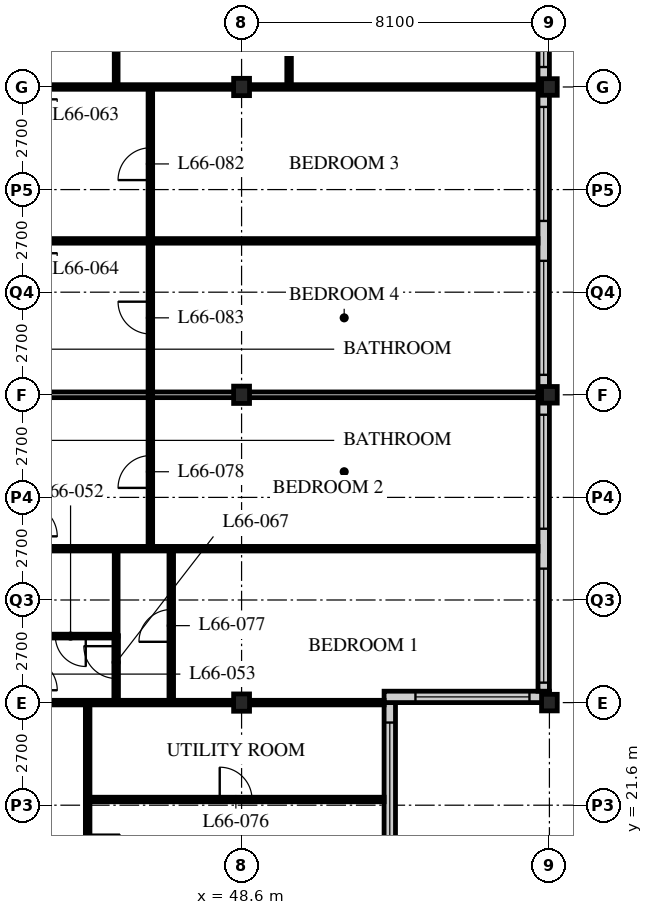
"""IFC4 building model, lengths in metres.
Left out: names, types, materials, properties, quantities, classifications, styles, units other than length and angle.
Written with IfcOpenShell. Run it as: python <this file> out.ifc"""

import sys

from ifc_helpers import new_model, si_unit, direction, frame, frame_2d, origin, origin_2d, place, context, subcontext, project, spatial, rectangle, i_section, extrude, element, fill, save


model = new_model("IFC4")
c1 = context("Model", 3, precision=1e-05, world=origin(), true_north=direction((0.0, 1.0)))
c2 = subcontext(c1, "Body", "Model", "MODEL_VIEW")
j1 = project(units=[si_unit("LENGTHUNIT", "METRE"), si_unit("PLANEANGLEUNIT", "RADIAN")], contexts=[c1])
p1 = place(None, origin())
s1 = spatial("IfcSite", under=j1, at=p1, CompositionType="ELEMENT")
p2 = place(p1, origin())
s2 = spatial("IfcBuilding", under=s1, at=p2, CompositionType="ELEMENT")
p3 = place(p2, frame((0.0, 0.0, 258.0)))
s3 = spatial("IfcBuildingStorey", under=s2, at=p3, CompositionType="ELEMENT", Elevation=258.0)
for number, where, z_axis, x_axis in (
    (1, (48.6, 24.3, 0.0), (0.0, 0.0, 1.0), (1.0, 0.0, 0.0)),
    (2, (48.6, 32.4, 0.0), (0.0, 0.0, 1.0), (1.0, 0.0, 0.0)),
    (3, (48.6, 40.5, 0.0), (0.0, 0.0, 1.0), (1.0, 0.0, 0.0)),
):
    element("IfcColumn", number, at=place(p3, frame(where, z_axis=z_axis, x_axis=x_axis)), inside=s3, PredefinedType="COLUMN", context=c2, shape_type="SweptSolid", body=[
        extrude(i_section(OverallWidth=0.418, OverallDepth=0.456, WebThickness=0.042, FlangeThickness=0.067, FilletRadius=0.015, at=origin_2d()), origin(), (0.0, 0.0, 1.0), 3.9),
    ])
for number, where, z_axis, x_axis in (
    (4, (56.7, 24.3, 0.0), (0.0, 0.0, 1.0), (1.0, 0.0, 0.0)),
    (5, (56.7, 32.4, 0.0), (0.0, 0.0, 1.0), (1.0, 0.0, 0.0)),
    (6, (56.7, 40.5, 0.0), (0.0, 0.0, 1.0), (1.0, 0.0, 0.0)),
):
    element("IfcColumn", number, at=place(p3, frame(where, z_axis=z_axis, x_axis=x_axis)), inside=s3, PredefinedType="COLUMN", context=c2, shape_type="SweptSolid", body=[
        extrude(i_section(OverallWidth=0.412, OverallDepth=0.437, WebThickness=0.036, FlangeThickness=0.058, FilletRadius=0.015, at=origin_2d()), origin(), (0.0, 0.0, 1.0), 3.9),
    ])
p4 = place(p3, frame((52.5, 20.55, 0.0), z_axis=(0.0, 0.0, 1.0), x_axis=(0.0, 1.0, 0.0)))
e7 = element("IfcWall", 7, at=p4, inside=s3, PredefinedType="SOLIDWALL", context=c2, shape_type="SweptSolid", body=[
    extrude(rectangle(XDim=3.75, YDim=0.3, at=frame_2d((1.875, 0.0))), origin(), (0.0, 0.0, 1.0), 3.69),
])
p5 = place(p4, frame((0.225, 0.0, 0.6)))
e8 = element("IfcOpeningElement", 8, at=p5, cuts=e7, PredefinedType="OPENING", context=c2, shape_type="SweptSolid", body=[
    extrude(rectangle(XDim=3.0, YDim=2.3, at=frame_2d((1.5, 1.15))), frame((0.0, 0.16, 0.0), z_axis=(0.0, -1.0, 0.0), x_axis=(1.0, 0.0, 0.0)), (0.0, 0.0, 1.0), 0.32),
])
p6 = place(p3, frame((52.35, 24.45, 0.0), z_axis=(0.0, 0.0, 1.0), x_axis=(1.0, 0.0, 0.0)))
e9 = element("IfcWall", 9, at=p6, inside=s3, PredefinedType="SOLIDWALL", context=c2, shape_type="SweptSolid", body=[
    extrude(rectangle(XDim=4.35, YDim=0.3, at=frame_2d((2.175, 0.0))), origin(), (0.0, 0.0, 1.0), 3.69),
])
p7 = place(p6, frame((0.825, 0.0, 0.6)))
e10 = element("IfcOpeningElement", 10, at=p7, cuts=e9, PredefinedType="OPENING", context=c2, shape_type="SweptSolid", body=[
    extrude(rectangle(XDim=3.0, YDim=2.3, at=frame_2d((1.5, 1.15))), frame((0.0, 0.16, 0.0), z_axis=(0.0, -1.0, 0.0), x_axis=(1.0, 0.0, 0.0)), (0.0, 0.0, 1.0), 0.32),
])
p8 = place(p3, frame((56.55, 24.6, 0.0), z_axis=(0.0, 0.0, 1.0), x_axis=(0.0, 1.0, 0.0)))
e11 = element("IfcWall", 11, at=p8, inside=s3, PredefinedType="SOLIDWALL", context=c2, shape_type="SweptSolid", body=[
    extrude(rectangle(XDim=32.1, YDim=0.3, at=frame_2d((16.05, 0.0))), origin(), (0.0, 0.0, 1.0), 3.69),
])
p9 = place(p8, frame((0.225, 0.0, 0.6)))
e12 = element("IfcOpeningElement", 12, at=p9, cuts=e11, PredefinedType="OPENING", context=c2, shape_type="SweptSolid", body=[
    extrude(rectangle(XDim=3.0, YDim=2.4, at=frame_2d((1.5, 1.2))), frame((0.0, 0.16, 0.0), z_axis=(0.0, -1.0, 0.0), x_axis=(1.0, 0.0, 0.0)), (0.0, 0.0, 1.0), 0.32),
])
p10 = place(p8, frame((4.275, 0.0, 0.6)))
e13 = element("IfcOpeningElement", 13, at=p10, cuts=e11, PredefinedType="OPENING", context=c2, shape_type="SweptSolid", body=[
    extrude(rectangle(XDim=3.0, YDim=2.4, at=frame_2d((1.5, 1.2))), frame((0.0, 0.16, 0.0), z_axis=(0.0, -1.0, 0.0), x_axis=(1.0, 0.0, 0.0)), (0.0, 0.0, 1.0), 0.32),
])
p11 = place(p8, frame((8.325, 0.0, 0.6)))
e14 = element("IfcOpeningElement", 14, at=p11, cuts=e11, PredefinedType="OPENING", context=c2, shape_type="SweptSolid", body=[
    extrude(rectangle(XDim=3.0, YDim=2.4, at=frame_2d((1.5, 1.2))), frame((0.0, 0.16, 0.0), z_axis=(0.0, -1.0, 0.0), x_axis=(1.0, 0.0, 0.0)), (0.0, 0.0, 1.0), 0.32),
])
p12 = place(p8, frame((12.375, 0.0, 0.6)))
e15 = element("IfcOpeningElement", 15, at=p12, cuts=e11, PredefinedType="OPENING", context=c2, shape_type="SweptSolid", body=[
    extrude(rectangle(XDim=3.0, YDim=2.4, at=frame_2d((1.5, 1.2))), frame((0.0, 0.16, 0.0), z_axis=(0.0, -1.0, 0.0), x_axis=(1.0, 0.0, 0.0)), (0.0, 0.0, 1.0), 0.32),
])
p13 = place(p8, frame((16.425, 0.0, 0.6)))
e16 = element("IfcOpeningElement", 16, at=p13, cuts=e11, PredefinedType="OPENING", context=c2, shape_type="SweptSolid", body=[
    extrude(rectangle(XDim=3.0, YDim=2.4, at=frame_2d((1.5, 1.2))), frame((0.0, 0.16, 0.0), z_axis=(0.0, -1.0, 0.0), x_axis=(1.0, 0.0, 0.0)), (0.0, 0.0, 1.0), 0.32),
])
p14 = place(p8, frame((20.475, 0.0, 0.6)))
e17 = element("IfcOpeningElement", 17, at=p14, cuts=e11, PredefinedType="OPENING", context=c2, shape_type="SweptSolid", body=[
    extrude(rectangle(XDim=3.0, YDim=2.4, at=frame_2d((1.5, 1.2))), frame((0.0, 0.16, 0.0), z_axis=(0.0, -1.0, 0.0), x_axis=(1.0, 0.0, 0.0)), (0.0, 0.0, 1.0), 0.32),
])
p15 = place(p8, frame((24.525, 0.0, 0.6)))
e18 = element("IfcOpeningElement", 18, at=p15, cuts=e11, PredefinedType="OPENING", context=c2, shape_type="SweptSolid", body=[
    extrude(rectangle(XDim=3.0, YDim=2.4, at=frame_2d((1.5, 1.2))), frame((0.0, 0.16, 0.0), z_axis=(0.0, -1.0, 0.0), x_axis=(1.0, 0.0, 0.0)), (0.0, 0.0, 1.0), 0.32),
])
p16 = place(p8, frame((28.575, 0.0, 0.6)))
e19 = element("IfcOpeningElement", 19, at=p16, cuts=e11, PredefinedType="OPENING", context=c2, shape_type="SweptSolid", body=[
    extrude(rectangle(XDim=3.0, YDim=2.4, at=frame_2d((1.5, 1.2))), frame((0.0, 0.16, 0.0), z_axis=(0.0, -1.0, 0.0), x_axis=(1.0, 0.0, 0.0)), (0.0, 0.0, 1.0), 0.32),
])
p17 = place(p3, frame((42.9, 24.3, 0.0), z_axis=(0.0, 0.0, 1.0), x_axis=(1.0, 0.0, 0.0)))
e20 = element("IfcWall", 20, at=p17, inside=s3, PredefinedType="PARTITIONING", context=c2, shape_type="SweptSolid", body=[
    extrude(rectangle(XDim=9.45, YDim=0.12, at=frame_2d((4.725, 0.0))), origin(), (0.0, 0.0, 1.0), 3.078),
])
p18 = place(p3, frame((40.5, 32.4, 0.0), z_axis=(0.0, 0.0, 1.0), x_axis=(1.0, 0.0, 0.0)))
e21 = element("IfcWall", 21, at=p18, inside=s3, PredefinedType="PARTITIONING", context=c2, shape_type="SweptSolid", body=[
    extrude(rectangle(XDim=15.9, YDim=0.15, at=frame_2d((7.95, 0.0))), origin(), (0.0, 0.0, 1.0), 3.078),
])
p19 = place(p3, frame((44.55, 16.5, 0.0), z_axis=(0.0, 0.0, 1.0), x_axis=(0.0, 1.0, 0.0)))
e22 = element("IfcWall", 22, at=p19, inside=s3, PredefinedType="PARTITIONING", context=c2, shape_type="SweptSolid", body=[
    extrude(rectangle(XDim=7.8, YDim=0.12, at=frame_2d((3.9, 0.0))), origin(), (0.0, 0.0, 1.0), 3.69),
])
p20 = place(p19, frame((3.475, 0.0, 0.0)))
e23 = element("IfcOpeningElement", 23, at=p20, cuts=e22, PredefinedType="OPENING", context=c2, shape_type="SweptSolid", body=[
    extrude(rectangle(XDim=0.85, YDim=2.1, at=frame_2d((0.425, 1.05))), frame((0.0, 0.07, 0.0), z_axis=(0.0, -1.0, 0.0), x_axis=(1.0, 0.0, 0.0)), (0.0, 0.0, 1.0), 0.14),
])
p21 = place(p3, frame((42.9, 26.05, 0.0), z_axis=(0.0, 0.0, 1.0), x_axis=(1.0, 0.0, 0.0)))
e24 = element("IfcWall", 24, at=p21, inside=s3, PredefinedType="PARTITIONING", context=c2, shape_type="SweptSolid", body=[
    extrude(rectangle(XDim=2.4, YDim=0.1, at=frame_2d((1.2, 0.0))), origin(), (0.0, 0.0, 1.0), 3.69),
])
p22 = place(p21, frame((0.8, 0.0, 0.0)))
e25 = element("IfcOpeningElement", 25, at=p22, cuts=e24, PredefinedType="OPENING", context=c2, shape_type="SweptSolid", body=[
    extrude(rectangle(XDim=0.8, YDim=2.1, at=frame_2d((0.4, 1.05))), frame((0.0, 0.06, 0.0), z_axis=(0.0, -1.0, 0.0), x_axis=(1.0, 0.0, 0.0)), (0.0, 0.0, 1.0), 0.12),
])
p23 = place(p3, frame((45.3, 26.05, 0.0), z_axis=(0.0, 0.0, 1.0), x_axis=(0.0, 1.0, 0.0)))
e26 = element("IfcWall", 26, at=p23, inside=s3, PredefinedType="PARTITIONING", context=c2, shape_type="SweptSolid", body=[
    extrude(rectangle(XDim=2.3, YDim=0.1, at=frame_2d((1.15, 0.0))), origin(), (0.0, 0.0, 1.0), 3.69),
])
p24 = place(p3, frame((42.9, 28.35, 0.0), z_axis=(0.0, 0.0, 1.0), x_axis=(1.0, 0.0, 0.0)))
e27 = element("IfcWall", 27, at=p24, inside=s3, PredefinedType="PARTITIONING", context=c2, shape_type="SweptSolid", body=[
    extrude(rectangle(XDim=13.5, YDim=0.12, at=frame_2d((6.75, 0.0))), origin(), (0.0, 0.0, 1.0), 3.69),
])
p25 = place(p3, frame((45.3, 42.8, 0.0), z_axis=(0.0, 0.0, 1.0), x_axis=(0.0, -1.0, 0.0)))
e28 = element("IfcWall", 28, at=p25, inside=s3, PredefinedType="PARTITIONING", context=c2, shape_type="SweptSolid", body=[
    extrude(rectangle(XDim=2.3, YDim=0.1, at=frame_2d((1.15, 0.0))), origin(), (0.0, 0.0, 1.0), 3.69),
])
p26 = place(p3, frame((42.9, 40.5, 0.0), z_axis=(0.0, 0.0, 1.0), x_axis=(1.0, 0.0, 0.0)))
e29 = element("IfcWall", 29, at=p26, inside=s3, PredefinedType="PARTITIONING", context=c2, shape_type="SweptSolid", body=[
    extrude(rectangle(XDim=13.5, YDim=0.12, at=frame_2d((6.75, 0.0))), origin(), (0.0, 0.0, 1.0), 3.078),
])
p27 = place(p3, frame((42.9, 36.45, 0.0), z_axis=(0.0, 0.0, 1.0), x_axis=(1.0, 0.0, 0.0)))
e30 = element("IfcWall", 30, at=p27, inside=s3, PredefinedType="PARTITIONING", context=c2, shape_type="SweptSolid", body=[
    extrude(rectangle(XDim=13.5, YDim=0.12, at=frame_2d((6.75, 0.0))), origin(), (0.0, 0.0, 1.0), 3.69),
])
p28 = place(p3, frame((45.3, 24.3, 0.0), z_axis=(0.0, 0.0, 1.0), x_axis=(0.0, 1.0, 0.0)))
e31 = element("IfcWall", 31, at=p28, inside=s3, PredefinedType="PARTITIONING", context=c2, shape_type="SweptSolid", body=[
    extrude(rectangle(XDim=1.76, YDim=0.12, at=frame_2d((0.88, 0.0))), origin(), (0.0, 0.0, 1.0), 3.69),
])
p29 = place(p28, frame((0.635, 0.0, 0.0)))
e32 = element("IfcOpeningElement", 32, at=p29, cuts=e31, PredefinedType="OPENING", context=c2, shape_type="SweptSolid", body=[
    extrude(rectangle(XDim=0.85, YDim=2.1, at=frame_2d((0.425, 1.05))), frame((0.0, 0.07, 0.0), z_axis=(0.0, -1.0, 0.0), x_axis=(1.0, 0.0, 0.0)), (0.0, 0.0, 1.0), 0.14),
])
p30 = place(p3, frame((44.55, 21.75, 0.0), z_axis=(0.0, 0.0, 1.0), x_axis=(1.0, 0.0, 0.0)))
e33 = element("IfcWall", 33, at=p30, inside=s3, PredefinedType="PARTITIONING", context=c2, shape_type="SweptSolid", body=[
    extrude(rectangle(XDim=7.8, YDim=0.12, at=frame_2d((3.9, 0.0))), origin(), (0.0, 0.0, 1.0), 3.69),
])
p31 = place(p30, frame((3.475, 0.0, 0.0)))
e34 = element("IfcOpeningElement", 34, at=p31, cuts=e33, PredefinedType="OPENING", context=c2, shape_type="SweptSolid", body=[
    extrude(rectangle(XDim=0.85, YDim=2.1, at=frame_2d((0.425, 1.05))), frame((0.0, 0.07, 0.0), z_axis=(0.0, -1.0, 0.0), x_axis=(1.0, 0.0, 0.0)), (0.0, 0.0, 1.0), 0.14),
])
p32 = place(p3, frame((46.75, 24.3, 0.0), z_axis=(0.0, 0.0, 1.0), x_axis=(0.0, 1.0, 0.0)))
e35 = element("IfcWall", 35, at=p32, inside=s3, PredefinedType="PARTITIONING", context=c2, shape_type="SweptSolid", body=[
    extrude(rectangle(XDim=4.05, YDim=0.12, at=frame_2d((2.025, 0.0))), origin(), (0.0, 0.0, 1.0), 3.69),
])
p33 = place(p32, frame((1.6, 0.0, 0.0)))
e36 = element("IfcOpeningElement", 36, at=p33, cuts=e35, PredefinedType="OPENING", context=c2, shape_type="SweptSolid", body=[
    extrude(rectangle(XDim=0.85, YDim=2.1, at=frame_2d((0.425, 1.05))), frame((0.0, 0.07, 0.0), z_axis=(0.0, -1.0, 0.0), x_axis=(1.0, 0.0, 0.0)), (0.0, 0.0, 1.0), 0.14),
])
p34 = place(p3, frame((46.2, 28.35, 0.0), z_axis=(0.0, 0.0, 1.0), x_axis=(0.0, 1.0, 0.0)))
e37 = element("IfcWall", 37, at=p34, inside=s3, PredefinedType="PARTITIONING", context=c2, shape_type="SweptSolid", body=[
    extrude(rectangle(XDim=12.15, YDim=0.12, at=frame_2d((6.075, 0.0))), origin(), (0.0, 0.0, 1.0), 3.69),
])
p35 = place(p34, frame((1.6, 0.0, 0.0)))
e38 = element("IfcOpeningElement", 38, at=p35, cuts=e37, PredefinedType="OPENING", context=c2, shape_type="SweptSolid", body=[
    extrude(rectangle(XDim=0.85, YDim=2.1, at=frame_2d((0.425, 1.05))), frame((0.0, 0.07, 0.0), z_axis=(0.0, -1.0, 0.0), x_axis=(1.0, 0.0, 0.0)), (0.0, 0.0, 1.0), 0.14),
])
p36 = place(p34, frame((9.7, 0.0, 0.0)))
e39 = element("IfcOpeningElement", 39, at=p36, cuts=e37, PredefinedType="OPENING", context=c2, shape_type="SweptSolid", body=[
    extrude(rectangle(XDim=0.85, YDim=2.1, at=frame_2d((0.425, 1.05))), frame((0.0, 0.07, 0.0), z_axis=(0.0, -1.0, 0.0), x_axis=(1.0, 0.0, 0.0)), (0.0, 0.0, 1.0), 0.14),
])
p37 = place(p34, frame((5.65, 0.0, 0.0)))
e40 = element("IfcOpeningElement", 40, at=p37, cuts=e37, PredefinedType="OPENING", context=c2, shape_type="SweptSolid", body=[
    extrude(rectangle(XDim=0.85, YDim=2.1, at=frame_2d((0.425, 1.05))), frame((0.0, 0.07, 0.0), z_axis=(0.0, -1.0, 0.0), x_axis=(1.0, 0.0, 0.0)), (0.0, 0.0, 1.0), 0.14),
])
p38 = place(p3, frame((49.85, 40.5, 0.0), z_axis=(0.0, 0.0, 1.0), x_axis=(0.0, 1.0, 0.0)))
e41 = element("IfcWall", 41, at=p38, inside=s3, PredefinedType="PARTITIONING", context=c2, shape_type="SweptSolid", body=[
    extrude(rectangle(XDim=6.3, YDim=0.12, at=frame_2d((3.15, 0.0))), origin(), (0.0, 0.0, 1.0), 3.69),
])
p39 = place(p38, frame((2.725, 0.0, 0.0)))
e42 = element("IfcOpeningElement", 42, at=p39, cuts=e41, PredefinedType="OPENING", context=c2, shape_type="SweptSolid", body=[
    extrude(rectangle(XDim=0.85, YDim=2.1, at=frame_2d((0.425, 1.05))), frame((0.0, 0.07, 0.0), z_axis=(0.0, -1.0, 0.0), x_axis=(1.0, 0.0, 0.0)), (0.0, 0.0, 1.0), 0.14),
])
p40 = place(p5, origin())
e43 = element("IfcWindow", 43, at=p40, inside=s3, PartitioningType="SINGLE_PANEL", PredefinedType="WINDOW", context=c2, shape_type="SweptSolid", body=[
    extrude(rectangle(XDim=3.0, YDim=2.3, at=frame_2d((1.5, 1.15))), frame((0.0, 0.03, 0.0), z_axis=(0.0, -1.0, 0.0), x_axis=(1.0, 0.0, 0.0)), (0.0, 0.0, 1.0), 0.06),
])
fill(e8, e43)
p41 = place(p7, origin())
e44 = element("IfcWindow", 44, at=p41, inside=s3, PartitioningType="SINGLE_PANEL", PredefinedType="WINDOW", context=c2, shape_type="SweptSolid", body=[
    extrude(rectangle(XDim=3.0, YDim=2.3, at=frame_2d((1.5, 1.15))), frame((0.0, 0.03, 0.0), z_axis=(0.0, -1.0, 0.0), x_axis=(1.0, 0.0, 0.0)), (0.0, 0.0, 1.0), 0.06),
])
fill(e10, e44)
p42 = place(p9, origin())
e45 = element("IfcWindow", 45, at=p42, inside=s3, PartitioningType="SINGLE_PANEL", PredefinedType="WINDOW", context=c2, shape_type="SweptSolid", body=[
    extrude(rectangle(XDim=3.0, YDim=2.4, at=frame_2d((1.5, 1.2))), frame((0.0, 0.03, 0.0), z_axis=(0.0, -1.0, 0.0), x_axis=(1.0, 0.0, 0.0)), (0.0, 0.0, 1.0), 0.06),
])
fill(e12, e45)
p43 = place(p10, origin())
e46 = element("IfcWindow", 46, at=p43, inside=s3, PartitioningType="SINGLE_PANEL", PredefinedType="WINDOW", context=c2, shape_type="SweptSolid", body=[
    extrude(rectangle(XDim=3.0, YDim=2.4, at=frame_2d((1.5, 1.2))), frame((0.0, 0.03, 0.0), z_axis=(0.0, -1.0, 0.0), x_axis=(1.0, 0.0, 0.0)), (0.0, 0.0, 1.0), 0.06),
])
fill(e13, e46)
p44 = place(p11, origin())
e47 = element("IfcWindow", 47, at=p44, inside=s3, PartitioningType="SINGLE_PANEL", PredefinedType="WINDOW", context=c2, shape_type="SweptSolid", body=[
    extrude(rectangle(XDim=3.0, YDim=2.4, at=frame_2d((1.5, 1.2))), frame((0.0, 0.03, 0.0), z_axis=(0.0, -1.0, 0.0), x_axis=(1.0, 0.0, 0.0)), (0.0, 0.0, 1.0), 0.06),
])
fill(e14, e47)
p45 = place(p12, origin())
e48 = element("IfcWindow", 48, at=p45, inside=s3, PartitioningType="SINGLE_PANEL", PredefinedType="WINDOW", context=c2, shape_type="SweptSolid", body=[
    extrude(rectangle(XDim=3.0, YDim=2.4, at=frame_2d((1.5, 1.2))), frame((0.0, 0.03, 0.0), z_axis=(0.0, -1.0, 0.0), x_axis=(1.0, 0.0, 0.0)), (0.0, 0.0, 1.0), 0.06),
])
fill(e15, e48)
p46 = place(p13, origin())
e49 = element("IfcWindow", 49, at=p46, inside=s3, PartitioningType="SINGLE_PANEL", PredefinedType="WINDOW", context=c2, shape_type="SweptSolid", body=[
    extrude(rectangle(XDim=3.0, YDim=2.4, at=frame_2d((1.5, 1.2))), frame((0.0, 0.03, 0.0), z_axis=(0.0, -1.0, 0.0), x_axis=(1.0, 0.0, 0.0)), (0.0, 0.0, 1.0), 0.06),
])
fill(e16, e49)
p47 = place(p20, origin())
e50 = element("IfcDoor", 50, at=p47, inside=s3, OperationType="SINGLE_SWING_LEFT", PredefinedType="DOOR", context=c2, shape_type="SweptSolid", body=[
    extrude(rectangle(XDim=0.85, YDim=2.1, at=frame_2d((0.425, 1.05))), frame((0.0, 0.025, 0.0), z_axis=(0.0, -1.0, 0.0), x_axis=(1.0, 0.0, 0.0)), (0.0, 0.0, 1.0), 0.05),
])
fill(e23, e50)
p48 = place(p22, origin())
e51 = element("IfcDoor", 51, at=p48, inside=s3, OperationType="SINGLE_SWING_LEFT", PredefinedType="DOOR", context=c2, shape_type="SweptSolid", body=[
    extrude(rectangle(XDim=0.8, YDim=2.1, at=frame_2d((0.4, 1.05))), frame((0.0, 0.025, 0.0), z_axis=(0.0, -1.0, 0.0), x_axis=(1.0, 0.0, 0.0)), (0.0, 0.0, 1.0), 0.05),
])
fill(e25, e51)
p49 = place(p29, origin())
e52 = element("IfcDoor", 52, at=p49, inside=s3, OperationType="SINGLE_SWING_RIGHT", PredefinedType="DOOR", context=c2, shape_type="SweptSolid", body=[
    extrude(rectangle(XDim=0.85, YDim=2.1, at=frame_2d((0.425, 1.05))), frame((0.0, 0.025, 0.0), z_axis=(0.0, -1.0, 0.0), x_axis=(1.0, 0.0, 0.0)), (0.0, 0.0, 1.0), 0.05),
])
fill(e32, e52)
p50 = place(p31, origin())
e53 = element("IfcDoor", 53, at=p50, inside=s3, OperationType="SINGLE_SWING_LEFT", PredefinedType="DOOR", context=c2, shape_type="SweptSolid", body=[
    extrude(rectangle(XDim=0.85, YDim=2.1, at=frame_2d((0.425, 1.05))), frame((0.0, 0.025, 0.0), z_axis=(0.0, -1.0, 0.0), x_axis=(1.0, 0.0, 0.0)), (0.0, 0.0, 1.0), 0.05),
])
fill(e34, e53)
p51 = place(p33, origin())
e54 = element("IfcDoor", 54, at=p51, inside=s3, OperationType="SINGLE_SWING_LEFT", PredefinedType="DOOR", context=c2, shape_type="SweptSolid", body=[
    extrude(rectangle(XDim=0.85, YDim=2.1, at=frame_2d((0.425, 1.05))), frame((0.0, 0.025, 0.0), z_axis=(0.0, -1.0, 0.0), x_axis=(1.0, 0.0, 0.0)), (0.0, 0.0, 1.0), 0.05),
])
fill(e36, e54)
p52 = place(p35, origin())
e55 = element("IfcDoor", 55, at=p52, inside=s3, OperationType="SINGLE_SWING_LEFT", PredefinedType="DOOR", context=c2, shape_type="SweptSolid", body=[
    extrude(rectangle(XDim=0.85, YDim=2.1, at=frame_2d((0.425, 1.05))), frame((0.0, 0.025, 0.0), z_axis=(0.0, -1.0, 0.0), x_axis=(1.0, 0.0, 0.0)), (0.0, 0.0, 1.0), 0.05),
])
fill(e38, e55)
p53 = place(p36, origin())
e56 = element("IfcDoor", 56, at=p53, inside=s3, OperationType="SINGLE_SWING_LEFT", PredefinedType="DOOR", context=c2, shape_type="SweptSolid", body=[
    extrude(rectangle(XDim=0.85, YDim=2.1, at=frame_2d((0.425, 1.05))), frame((0.0, 0.025, 0.0), z_axis=(0.0, -1.0, 0.0), x_axis=(1.0, 0.0, 0.0)), (0.0, 0.0, 1.0), 0.05),
])
fill(e39, e56)
p54 = place(p37, origin())
e57 = element("IfcDoor", 57, at=p54, inside=s3, OperationType="SINGLE_SWING_RIGHT", PredefinedType="DOOR", context=c2, shape_type="SweptSolid", body=[
    extrude(rectangle(XDim=0.85, YDim=2.1, at=frame_2d((0.425, 1.05))), frame((0.0, 0.025, 0.0), z_axis=(0.0, -1.0, 0.0), x_axis=(1.0, 0.0, 0.0)), (0.0, 0.0, 1.0), 0.05),
])
fill(e40, e57)
save(model, sys.argv[1])
